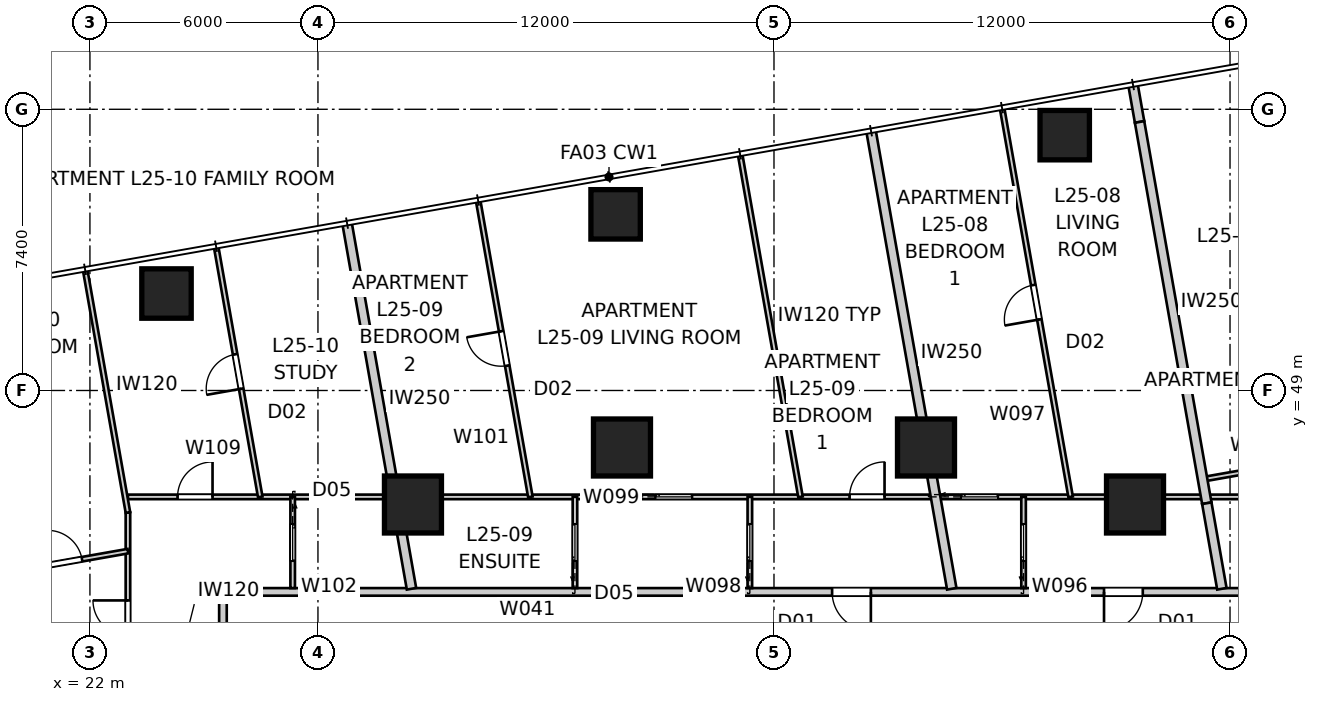
"""IFC4 building model, lengths in metres.
Left out: names, types, materials, properties, quantities, classifications, styles, units other than length and angle.
Written with IfcOpenShell. Run it as: python <this file> out.ifc"""

import sys

from ifc_helpers import new_model, si_unit, direction, frame, frame_2d, origin, origin_2d, place, context, subcontext, project, spatial, rectangle, extrude, element, fill, save


model = new_model("IFC4")
c1 = context("Model", 3, precision=1e-05, world=origin(), true_north=direction((0.0, 1.0)))
c2 = subcontext(c1, "Body", "Model", "MODEL_VIEW")
j1 = project(units=[si_unit("LENGTHUNIT", "METRE"), si_unit("PLANEANGLEUNIT", "RADIAN")], contexts=[c1])
p1 = place(None, origin())
s1 = spatial("IfcSite", under=j1, at=p1, CompositionType="ELEMENT")
p2 = place(p1, origin())
s2 = spatial("IfcBuilding", under=s1, at=p2, CompositionType="ELEMENT")
p3 = place(p2, frame((0.0, 0.0, 93.0)))
s3 = spatial("IfcBuildingStorey", under=s2, at=p3, CompositionType="ELEMENT", Elevation=93.0)
for number, where, z_axis, x_axis in (
    (1, (47.65, 55.719, 0.0), (0.0, 0.0, 1.0), (1.0, 0.0, 0.0)),
    (2, (35.833, 53.635, 0.0), (0.0, 0.0, 1.0), (1.0, 0.0, 0.0)),
    (3, (24.015, 51.552, 0.0), (0.0, 0.0, 1.0), (1.0, 0.0, 0.0)),
):
    element("IfcColumn", number, at=place(p3, frame(where, z_axis=z_axis, x_axis=x_axis)), inside=s3, PredefinedType="COLUMN", context=c2, shape_type="SweptSolid", body=[
        extrude(rectangle(XDim=1.3, YDim=1.3, at=origin_2d()), origin(), (0.0, 0.0, 1.0), 3.4),
    ])
for number, where, z_axis, x_axis in (
    (4, (49.5, 46.0, 0.0), (0.0, 0.0, 1.0), (1.0, 0.0, 0.0)),
    (5, (44.0, 47.5, 0.0), (0.0, 0.0, 1.0), (1.0, 0.0, 0.0)),
    (6, (36.0, 47.5, 0.0), (0.0, 0.0, 1.0), (1.0, 0.0, 0.0)),
    (7, (30.5, 46.0, 0.0), (0.0, 0.0, 1.0), (1.0, 0.0, 0.0)),
):
    element("IfcColumn", number, at=place(p3, frame(where, z_axis=z_axis, x_axis=x_axis)), inside=s3, PredefinedType="COLUMN", context=c2, shape_type="SweptSolid", body=[
        extrude(rectangle(XDim=1.5, YDim=1.5, at=origin_2d()), origin(), (0.0, 0.0, 1.0), 3.4),
    ])
p4 = place(p3, frame((54.5, 43.7, 0.0), z_axis=(0.0, 0.0, 1.0), x_axis=(-1.0, 0.0, 0.0)))
e8 = element("IfcWall", 8, at=p4, inside=s3, PredefinedType="PARTITIONING", context=c2, shape_type="SweptSolid", body=[
    extrude(rectangle(XDim=29.0, YDim=0.2, at=frame_2d((14.5, 0.0))), origin(), (0.0, 0.0, 1.0), 3.25),
])
p5 = place(p4, frame((11.951, 0.0, 0.0)))
e9 = element("IfcOpeningElement", 9, at=p5, cuts=e8, PredefinedType="OPENING", context=c2, shape_type="SweptSolid", body=[
    extrude(rectangle(XDim=1.02, YDim=2.34, at=frame_2d((0.51, 1.17))), frame((0.0, 0.11, 0.0), z_axis=(0.0, -1.0, 0.0), x_axis=(1.0, 0.0, 0.0)), (0.0, 0.0, 1.0), 0.22),
])
p6 = place(p4, frame((4.795, 0.0, 0.0)))
e10 = element("IfcOpeningElement", 10, at=p6, cuts=e8, PredefinedType="OPENING", context=c2, shape_type="SweptSolid", body=[
    extrude(rectangle(XDim=1.02, YDim=2.34, at=frame_2d((0.51, 1.17))), frame((0.0, 0.11, 0.0), z_axis=(0.0, -1.0, 0.0), x_axis=(1.0, 0.0, 0.0)), (0.0, 0.0, 1.0), 0.22),
])
p7 = place(p3, frame((25.5, 43.7, 0.0), z_axis=(0.0, 0.0, 1.0), x_axis=(0.0, -1.0, 0.0)))
e11 = element("IfcWall", 11, at=p7, inside=s3, PredefinedType="PARTITIONING", context=c2, shape_type="SweptSolid", body=[
    extrude(rectangle(XDim=27.4, YDim=0.2, at=frame_2d((13.7, 0.0))), origin(), (0.0, 0.0, 1.0), 3.25),
])
p8 = place(p7, frame((24.333, 0.0, 0.0)))
e12 = element("IfcOpeningElement", 12, at=p8, cuts=e11, PredefinedType="OPENING", context=c2, shape_type="SweptSolid", body=[
    extrude(rectangle(XDim=1.02, YDim=2.1, at=frame_2d((0.51, 1.05))), frame((0.0, 0.11, 0.0), z_axis=(0.0, -1.0, 0.0), x_axis=(1.0, 0.0, 0.0)), (0.0, 0.0, 1.0), 0.22),
])
p9 = place(p7, frame((10.631, 0.0, 0.0)))
e13 = element("IfcOpeningElement", 13, at=p9, cuts=e11, PredefinedType="OPENING", context=c2, shape_type="SweptSolid", body=[
    extrude(rectangle(XDim=1.02, YDim=2.34, at=frame_2d((0.51, 1.17))), frame((0.0, 0.11, 0.0), z_axis=(0.0, -1.0, 0.0), x_axis=(1.0, 0.0, 0.0)), (0.0, 0.0, 1.0), 0.22),
])
p10 = place(p7, frame((0.911, 0.0, 0.0)))
e14 = element("IfcOpeningElement", 14, at=p10, cuts=e11, PredefinedType="OPENING", context=c2, shape_type="SweptSolid", body=[
    extrude(rectangle(XDim=1.02, YDim=2.34, at=frame_2d((0.51, 1.17))), frame((0.0, 0.11, 0.0), z_axis=(0.0, -1.0, 0.0), x_axis=(1.0, 0.0, 0.0)), (0.0, 0.0, 1.0), 0.22),
])
p11 = place(p3, frame((42.552, 55.836, 0.0), z_axis=(0.0, 0.0, 1.0), x_axis=(0.173639677872, -0.984809251718, 0.0)))
e15 = element("IfcWall", 15, at=p11, inside=s3, PredefinedType="PARTITIONING", context=c2, shape_type="SweptSolid", body=[
    extrude(rectangle(XDim=12.24, YDim=0.25, at=frame_2d((6.12, 0.0))), origin(), (0.0, 0.0, 1.0), 3.25),
])
p12 = place(p3, frame((28.765, 53.405, 0.0), z_axis=(0.0, 0.0, 1.0), x_axis=(0.173658469802, -0.984805938176, 0.0)))
e16 = element("IfcWall", 16, at=p12, inside=s3, PredefinedType="PARTITIONING", context=c2, shape_type="SweptSolid", body=[
    extrude(rectangle(XDim=9.771, YDim=0.25, at=frame_2d((4.885, 0.0))), origin(), (0.0, 0.0, 1.0), 3.25),
])
p13 = place(p3, frame((49.446, 57.051, 0.0), z_axis=(0.0, 0.0, 1.0), x_axis=(0.173813186416, -0.984778643263, 0.0)))
e17 = element("IfcWall", 17, at=p13, inside=s3, PredefinedType="PARTITIONING", context=c2, shape_type="SweptSolid", body=[
    extrude(rectangle(XDim=1.0, YDim=0.25, at=frame_2d((0.5, 0.0))), origin(), (0.0, 0.0, 1.0), 3.25),
])
p14 = place(p3, frame((49.62, 56.066, 0.0), z_axis=(0.0, 0.0, 1.0), x_axis=(0.173644522411, -0.984808397525, 0.0)))
e18 = element("IfcWall", 18, at=p14, inside=s3, PredefinedType="PARTITIONING", context=c2, shape_type="SweptSolid", body=[
    extrude(rectangle(XDim=10.188, YDim=0.25, at=frame_2d((5.094, 0.0))), origin(), (0.0, 0.0, 1.0), 2.638),
])
p15 = place(p3, frame((51.389, 46.033, 0.0), z_axis=(0.0, 0.0, 1.0), x_axis=(0.173657387043, -0.984806129106, 0.0)))
e19 = element("IfcWall", 19, at=p15, inside=s3, PredefinedType="PARTITIONING", context=c2, shape_type="SweptSolid", body=[
    extrude(rectangle(XDim=2.286, YDim=0.25, at=frame_2d((1.143, 0.0))), origin(), (0.0, 0.0, 1.0), 3.25),
])
p16 = place(p3, frame((23.0, 46.2, 0.0), z_axis=(0.0, 0.0, 1.0), x_axis=(1.0, 0.0, 0.0)))
e20 = element("IfcWall", 20, at=p16, inside=s3, PredefinedType="PARTITIONING", context=c2, shape_type="SweptSolid", body=[
    extrude(rectangle(XDim=34.0, YDim=0.12, at=frame_2d((17.0, 0.0))), origin(), (0.0, 0.0, 1.0), 2.55),
])
p17 = place(p16, frame((18.989, 0.0, 0.0)))
e21 = element("IfcOpeningElement", 21, at=p17, cuts=e20, PredefinedType="OPENING", context=c2, shape_type="SweptSolid", body=[
    extrude(rectangle(XDim=0.92, YDim=2.34, at=frame_2d((0.46, 1.17))), frame((0.0, 0.07, 0.0), z_axis=(0.0, -1.0, 0.0), x_axis=(1.0, 0.0, 0.0)), (0.0, 0.0, 1.0), 0.14),
])
p18 = place(p16, frame((1.306, 0.0, 0.0)))
e22 = element("IfcOpeningElement", 22, at=p18, cuts=e20, PredefinedType="OPENING", context=c2, shape_type="SweptSolid", body=[
    extrude(rectangle(XDim=0.92, YDim=2.34, at=frame_2d((0.46, 1.17))), frame((0.0, 0.07, 0.0), z_axis=(0.0, -1.0, 0.0), x_axis=(1.0, 0.0, 0.0)), (0.0, 0.0, 1.0), 0.14),
])
p19 = place(p16, frame((13.884, 0.0, 0.0)))
e23 = element("IfcOpeningElement", 23, at=p19, cuts=e20, PredefinedType="OPENING", context=c2, shape_type="SweptSolid", body=[
    extrude(rectangle(XDim=0.96, YDim=2.1, at=frame_2d((0.48, 1.05))), frame((0.0, 0.07, 0.0), z_axis=(0.0, -1.0, 0.0), x_axis=(1.0, 0.0, 0.0)), (0.0, 0.0, 1.0), 0.14),
])
p20 = place(p16, frame((21.929, 0.0, 0.0)))
e24 = element("IfcOpeningElement", 24, at=p20, cuts=e20, PredefinedType="OPENING", context=c2, shape_type="SweptSolid", body=[
    extrude(rectangle(XDim=0.96, YDim=2.1, at=frame_2d((0.48, 1.05))), frame((0.0, 0.07, 0.0), z_axis=(0.0, -1.0, 0.0), x_axis=(1.0, 0.0, 0.0)), (0.0, 0.0, 1.0), 0.14),
])
p21 = place(p3, frame((58.172, 47.877, 0.0), z_axis=(0.0, 0.0, 1.0), x_axis=(-0.984806372973, -0.173656004074, 0.0)))
e25 = element("IfcWall", 25, at=p21, inside=s3, PredefinedType="PARTITIONING", context=c2, shape_type="SweptSolid", body=[
    extrude(rectangle(XDim=7.0, YDim=0.12, at=frame_2d((3.5, 0.0))), origin(), (0.0, 0.0, 1.0), 3.25),
])
p22 = place(p21, frame((2.89, 0.0, 0.0)))
e26 = element("IfcOpeningElement", 26, at=p22, cuts=e25, PredefinedType="OPENING", context=c2, shape_type="SweptSolid", body=[
    extrude(rectangle(XDim=0.92, YDim=2.34, at=frame_2d((0.46, 1.17))), frame((0.0, 0.07, 0.0), z_axis=(0.0, -1.0, 0.0), x_axis=(1.0, 0.0, 0.0)), (0.0, 0.0, 1.0), 0.14),
])
p23 = place(p3, frame((46.567, 43.8, 0.0), z_axis=(0.0, 0.0, 1.0), x_axis=(0.0, 1.0, 0.0)))
e27 = element("IfcWall", 27, at=p23, inside=s3, PredefinedType="PARTITIONING", context=c2, shape_type="SweptSolid", body=[
    extrude(rectangle(XDim=2.4, YDim=0.12, at=frame_2d((1.2, 0.0))), origin(), (0.0, 0.0, 1.0), 3.25),
])
p24 = place(p23, frame((0.72, 0.0, 0.0)))
e28 = element("IfcOpeningElement", 28, at=p24, cuts=e27, PredefinedType="OPENING", context=c2, shape_type="SweptSolid", body=[
    extrude(rectangle(XDim=0.96, YDim=2.1, at=frame_2d((0.48, 1.05))), frame((0.0, 0.07, 0.0), z_axis=(0.0, -1.0, 0.0), x_axis=(1.0, 0.0, 0.0)), (0.0, 0.0, 1.0), 0.14),
])
p25 = place(p3, frame((47.805, 46.2, 0.0), z_axis=(0.0, 0.0, 1.0), x_axis=(-0.173653605279, 0.984806795962, 0.0)))
e29 = element("IfcWall", 29, at=p25, inside=s3, PredefinedType="PARTITIONING", context=c2, shape_type="SweptSolid", body=[
    extrude(rectangle(XDim=10.362, YDim=0.12, at=frame_2d((5.181, 0.0))), origin(), (0.0, 0.0, 1.0), 3.25),
])
p26 = place(p25, frame((4.741, 0.0, 0.0)))
e30 = element("IfcOpeningElement", 30, at=p26, cuts=e29, PredefinedType="OPENING", context=c2, shape_type="SweptSolid", body=[
    extrude(rectangle(XDim=0.92, YDim=2.34, at=frame_2d((0.46, 1.17))), frame((0.0, 0.07, 0.0), z_axis=(0.0, -1.0, 0.0), x_axis=(1.0, 0.0, 0.0)), (0.0, 0.0, 1.0), 0.14),
])
p27 = place(p3, frame((39.365, 43.8, 0.0), z_axis=(0.0, 0.0, 1.0), x_axis=(0.0, 1.0, 0.0)))
e31 = element("IfcWall", 31, at=p27, inside=s3, PredefinedType="PARTITIONING", context=c2, shape_type="SweptSolid", body=[
    extrude(rectangle(XDim=2.4, YDim=0.12, at=frame_2d((1.2, 0.0))), origin(), (0.0, 0.0, 1.0), 3.25),
])
p28 = place(p27, frame((0.72, 0.0, 0.0)))
e32 = element("IfcOpeningElement", 32, at=p28, cuts=e31, PredefinedType="OPENING", context=c2, shape_type="SweptSolid", body=[
    extrude(rectangle(XDim=0.96, YDim=2.1, at=frame_2d((0.48, 1.05))), frame((0.0, 0.07, 0.0), z_axis=(0.0, -1.0, 0.0), x_axis=(1.0, 0.0, 0.0)), (0.0, 0.0, 1.0), 0.14),
])
p29 = place(p3, frame((34.763, 43.8, 0.0), z_axis=(0.0, 0.0, 1.0), x_axis=(0.0, 1.0, 0.0)))
e33 = element("IfcWall", 33, at=p29, inside=s3, PredefinedType="PARTITIONING", context=c2, shape_type="SweptSolid", body=[
    extrude(rectangle(XDim=2.4, YDim=0.12, at=frame_2d((1.2, 0.0))), origin(), (0.0, 0.0, 1.0), 3.25),
])
p30 = place(p29, frame((0.72, 0.0, 0.0)))
e34 = element("IfcOpeningElement", 34, at=p30, cuts=e33, PredefinedType="OPENING", context=c2, shape_type="SweptSolid", body=[
    extrude(rectangle(XDim=0.96, YDim=2.1, at=frame_2d((0.48, 1.05))), frame((0.0, 0.07, 0.0), z_axis=(0.0, -1.0, 0.0), x_axis=(1.0, 0.0, 0.0)), (0.0, 0.0, 1.0), 0.14),
])
p31 = place(p3, frame((39.113, 55.188, 0.0), z_axis=(0.0, 0.0, 1.0), x_axis=(0.173652576186, -0.984806977424, 0.0)))
e35 = element("IfcWall", 35, at=p31, inside=s3, PredefinedType="PARTITIONING", context=c2, shape_type="SweptSolid", body=[
    extrude(rectangle(XDim=9.127, YDim=0.12, at=frame_2d((4.563, 0.0))), origin(), (0.0, 0.0, 1.0), 3.25),
])
p32 = place(p3, frame((33.59, 46.2, 0.0), z_axis=(0.0, 0.0, 1.0), x_axis=(-0.173645935638, 0.98480814834, 0.0)))
e36 = element("IfcWall", 36, at=p32, inside=s3, PredefinedType="PARTITIONING", context=c2, shape_type="SweptSolid", body=[
    extrude(rectangle(XDim=7.893, YDim=0.12, at=frame_2d((3.947, 0.0))), origin(), (0.0, 0.0, 1.0), 3.25),
])
p33 = place(p32, frame((3.507, 0.0, 0.0)))
e37 = element("IfcOpeningElement", 37, at=p33, cuts=e36, PredefinedType="OPENING", context=c2, shape_type="SweptSolid", body=[
    extrude(rectangle(XDim=0.92, YDim=2.34, at=frame_2d((0.46, 1.17))), frame((0.0, 0.07, 0.0), z_axis=(0.0, -1.0, 0.0), x_axis=(1.0, 0.0, 0.0)), (0.0, 0.0, 1.0), 0.14),
])
p34 = place(p3, frame((27.335, 46.2, 0.0), z_axis=(0.0, 0.0, 1.0), x_axis=(0.0, -1.0, 0.0)))
e38 = element("IfcWall", 38, at=p34, inside=s3, PredefinedType="PARTITIONING", context=c2, shape_type="SweptSolid", body=[
    extrude(rectangle(XDim=2.4, YDim=0.12, at=frame_2d((1.2, 0.0))), origin(), (0.0, 0.0, 1.0), 2.722),
])
p35 = place(p34, frame((0.72, 0.0, 0.0)))
e39 = element("IfcOpeningElement", 39, at=p35, cuts=e38, PredefinedType="OPENING", context=c2, shape_type="SweptSolid", body=[
    extrude(rectangle(XDim=0.96, YDim=2.1, at=frame_2d((0.48, 1.05))), frame((0.0, 0.07, 0.0), z_axis=(0.0, -1.0, 0.0), x_axis=(1.0, 0.0, 0.0)), (0.0, 0.0, 1.0), 0.14),
])
p36 = place(p3, frame((23.0, 41.208, 0.0), z_axis=(0.0, 0.0, 1.0), x_axis=(0.0, 1.0, 0.0)))
e40 = element("IfcWall", 40, at=p36, inside=s3, PredefinedType="PARTITIONING", context=c2, shape_type="SweptSolid", body=[
    extrude(rectangle(XDim=4.581, YDim=0.12, at=frame_2d((2.291, 0.0))), origin(), (0.0, 0.0, 1.0), 2.638),
])
p37 = place(p36, frame((1.348, 0.0, 0.0)))
e41 = element("IfcOpeningElement", 41, at=p37, cuts=e40, PredefinedType="OPENING", context=c2, shape_type="SweptSolid", body=[
    extrude(rectangle(XDim=0.92, YDim=2.34, at=frame_2d((0.46, 1.17))), frame((0.0, 0.07, 0.0), z_axis=(0.0, -1.0, 0.0), x_axis=(1.0, 0.0, 0.0)), (0.0, 0.0, 1.0), 0.14),
])
p38 = place(p3, frame((12.38, 42.9, 0.0), z_axis=(0.0, 0.0, 1.0), x_axis=(0.984807253583, 0.173651010046, 0.0)))
e42 = element("IfcWall", 42, at=p38, inside=s3, PredefinedType="PARTITIONING", context=c2, shape_type="SweptSolid", body=[
    extrude(rectangle(XDim=10.783, YDim=0.12, at=frame_2d((5.392, 0.0))), origin(), (0.0, 0.0, 1.0), 3.25),
])
p39 = place(p38, frame((1.525, 0.0, 0.0)))
e43 = element("IfcOpeningElement", 43, at=p39, cuts=e42, PredefinedType="OPENING", context=c2, shape_type="SweptSolid", body=[
    extrude(rectangle(XDim=0.92, YDim=2.34, at=frame_2d((0.46, 1.17))), frame((0.0, 0.07, 0.0), z_axis=(0.0, -1.0, 0.0), x_axis=(1.0, 0.0, 0.0)), (0.0, 0.0, 1.0), 0.14),
])
p40 = place(p38, frame((5.25, 0.0, 0.0)))
e44 = element("IfcOpeningElement", 44, at=p40, cuts=e42, PredefinedType="OPENING", context=c2, shape_type="SweptSolid", body=[
    extrude(rectangle(XDim=0.92, YDim=2.34, at=frame_2d((0.46, 1.17))), frame((0.0, 0.07, 0.0), z_axis=(0.0, -1.0, 0.0), x_axis=(1.0, 0.0, 0.0)), (0.0, 0.0, 1.0), 0.14),
])
p41 = place(p38, frame((8.637, 0.0, 0.0)))
e45 = element("IfcOpeningElement", 45, at=p41, cuts=e42, PredefinedType="OPENING", context=c2, shape_type="SweptSolid", body=[
    extrude(rectangle(XDim=0.92, YDim=2.34, at=frame_2d((0.46, 1.17))), frame((0.0, 0.07, 0.0), z_axis=(0.0, -1.0, 0.0), x_axis=(1.0, 0.0, 0.0)), (0.0, 0.0, 1.0), 0.14),
])
p42 = place(p3, frame((21.878, 52.15, 0.0), z_axis=(0.0, 0.0, 1.0), x_axis=(0.173653792983, -0.984806762864, 0.0)))
e46 = element("IfcWall", 46, at=p42, inside=s3, PredefinedType="PARTITIONING", context=c2, shape_type="SweptSolid", body=[
    extrude(rectangle(XDim=6.459, YDim=0.12, at=frame_2d((3.229, 0.0))), origin(), (0.0, 0.0, 1.0), 2.638),
])
p43 = place(p3, frame((26.481, 46.2, 0.0), z_axis=(0.0, 0.0, 1.0), x_axis=(-0.173643103339, 0.98480864774, 0.0)))
e47 = element("IfcWall", 47, at=p43, inside=s3, PredefinedType="PARTITIONING", context=c2, shape_type="SweptSolid", body=[
    extrude(rectangle(XDim=6.659, YDim=0.12, at=frame_2d((3.329, 0.0))), origin(), (0.0, 0.0, 1.0), 3.25),
])
p44 = place(p43, frame((2.889, 0.0, 0.0)))
e48 = element("IfcOpeningElement", 48, at=p44, cuts=e47, PredefinedType="OPENING", context=c2, shape_type="SweptSolid", body=[
    extrude(rectangle(XDim=0.92, YDim=2.34, at=frame_2d((0.46, 1.17))), frame((0.0, 0.07, 0.0), z_axis=(0.0, -1.0, 0.0), x_axis=(1.0, 0.0, 0.0)), (0.0, 0.0, 1.0), 0.14),
])
p45 = place(p5, origin())
e49 = element("IfcDoor", 49, at=p45, inside=s3, OperationType="SINGLE_SWING_LEFT", PredefinedType="DOOR", context=c2, shape_type="SweptSolid", body=[
    extrude(rectangle(XDim=1.02, YDim=2.34, at=frame_2d((0.51, 1.17))), frame((0.0, 0.025, 0.0), z_axis=(0.0, -1.0, 0.0), x_axis=(1.0, 0.0, 0.0)), (0.0, 0.0, 1.0), 0.05),
])
fill(e9, e49)
p46 = place(p6, origin())
e50 = element("IfcDoor", 50, at=p46, inside=s3, OperationType="SINGLE_SWING_RIGHT", PredefinedType="DOOR", context=c2, shape_type="SweptSolid", body=[
    extrude(rectangle(XDim=1.02, YDim=2.34, at=frame_2d((0.51, 1.17))), frame((0.0, 0.025, 0.0), z_axis=(0.0, -1.0, 0.0), x_axis=(1.0, 0.0, 0.0)), (0.0, 0.0, 1.0), 0.05),
])
fill(e10, e50)
p47 = place(p17, origin())
e51 = element("IfcDoor", 51, at=p47, inside=s3, OperationType="SINGLE_SWING_RIGHT", PredefinedType="DOOR", context=c2, shape_type="SweptSolid", body=[
    extrude(rectangle(XDim=0.92, YDim=2.34, at=frame_2d((0.46, 1.17))), frame((0.0, 0.025, 0.0), z_axis=(0.0, -1.0, 0.0), x_axis=(1.0, 0.0, 0.0)), (0.0, 0.0, 1.0), 0.05),
])
fill(e21, e51)
p48 = place(p28, origin())
e52 = element("IfcDoor", 52, at=p48, inside=s3, OperationType="SLIDING_TO_LEFT", PredefinedType="DOOR", context=c2, shape_type="SweptSolid", body=[
    extrude(rectangle(XDim=0.96, YDim=2.1, at=frame_2d((0.48, 1.05))), frame((0.0, 0.025, 0.0), z_axis=(0.0, -1.0, 0.0), x_axis=(1.0, 0.0, 0.0)), (0.0, 0.0, 1.0), 0.05),
])
fill(e32, e52)
p49 = place(p24, origin())
e53 = element("IfcDoor", 53, at=p49, inside=s3, OperationType="SLIDING_TO_LEFT", PredefinedType="DOOR", context=c2, shape_type="SweptSolid", body=[
    extrude(rectangle(XDim=0.96, YDim=2.1, at=frame_2d((0.48, 1.05))), frame((0.0, 0.025, 0.0), z_axis=(0.0, -1.0, 0.0), x_axis=(1.0, 0.0, 0.0)), (0.0, 0.0, 1.0), 0.05),
])
fill(e28, e53)
p50 = place(p37, origin())
e54 = element("IfcDoor", 54, at=p50, inside=s3, OperationType="SINGLE_SWING_RIGHT", PredefinedType="DOOR", context=c2, shape_type="SweptSolid", body=[
    extrude(rectangle(XDim=0.92, YDim=2.34, at=frame_2d((0.46, 1.17))), frame((0.0, 0.025, 0.0), z_axis=(0.0, -1.0, 0.0), x_axis=(1.0, 0.0, 0.0)), (0.0, 0.0, 1.0), 0.05),
])
fill(e41, e54)
p51 = place(p18, origin())
e55 = element("IfcDoor", 55, at=p51, inside=s3, OperationType="SINGLE_SWING_RIGHT", PredefinedType="DOOR", context=c2, shape_type="SweptSolid", body=[
    extrude(rectangle(XDim=0.92, YDim=2.34, at=frame_2d((0.46, 1.17))), frame((0.0, 0.025, 0.0), z_axis=(0.0, -1.0, 0.0), x_axis=(1.0, 0.0, 0.0)), (0.0, 0.0, 1.0), 0.05),
])
fill(e22, e55)
p52 = place(p35, origin())
e56 = element("IfcDoor", 56, at=p52, inside=s3, OperationType="SLIDING_TO_LEFT", PredefinedType="DOOR", context=c2, shape_type="SweptSolid", body=[
    extrude(rectangle(XDim=0.96, YDim=2.1, at=frame_2d((0.48, 1.05))), frame((0.0, 0.025, 0.0), z_axis=(0.0, -1.0, 0.0), x_axis=(1.0, 0.0, 0.0)), (0.0, 0.0, 1.0), 0.05),
])
fill(e39, e56)
p53 = place(p19, origin())
e57 = element("IfcDoor", 57, at=p53, inside=s3, OperationType="SLIDING_TO_LEFT", PredefinedType="DOOR", context=c2, shape_type="SweptSolid", body=[
    extrude(rectangle(XDim=0.96, YDim=2.1, at=frame_2d((0.48, 1.05))), frame((0.0, 0.025, 0.0), z_axis=(0.0, -1.0, 0.0), x_axis=(1.0, 0.0, 0.0)), (0.0, 0.0, 1.0), 0.05),
])
fill(e23, e57)
p54 = place(p30, origin())
e58 = element("IfcDoor", 58, at=p54, inside=s3, OperationType="SLIDING_TO_LEFT", PredefinedType="DOOR", context=c2, shape_type="SweptSolid", body=[
    extrude(rectangle(XDim=0.96, YDim=2.1, at=frame_2d((0.48, 1.05))), frame((0.0, 0.025, 0.0), z_axis=(0.0, -1.0, 0.0), x_axis=(1.0, 0.0, 0.0)), (0.0, 0.0, 1.0), 0.05),
])
fill(e34, e58)
p55 = place(p20, origin())
e59 = element("IfcDoor", 59, at=p55, inside=s3, OperationType="SLIDING_TO_LEFT", PredefinedType="DOOR", context=c2, shape_type="SweptSolid", body=[
    extrude(rectangle(XDim=0.96, YDim=2.1, at=frame_2d((0.48, 1.05))), frame((0.0, 0.025, 0.0), z_axis=(0.0, -1.0, 0.0), x_axis=(1.0, 0.0, 0.0)), (0.0, 0.0, 1.0), 0.05),
])
fill(e24, e59)
p56 = place(p41, origin())
e60 = element("IfcDoor", 60, at=p56, inside=s3, OperationType="SINGLE_SWING_LEFT", PredefinedType="DOOR", context=c2, shape_type="SweptSolid", body=[
    extrude(rectangle(XDim=0.92, YDim=2.34, at=frame_2d((0.46, 1.17))), frame((0.0, 0.025, 0.0), z_axis=(0.0, -1.0, 0.0), x_axis=(1.0, 0.0, 0.0)), (0.0, 0.0, 1.0), 0.05),
])
fill(e45, e60)
p57 = place(p44, origin())
e61 = element("IfcDoor", 61, at=p57, inside=s3, OperationType="SINGLE_SWING_LEFT", PredefinedType="DOOR", context=c2, shape_type="SweptSolid", body=[
    extrude(rectangle(XDim=0.92, YDim=2.34, at=frame_2d((0.46, 1.17))), frame((0.0, 0.025, 0.0), z_axis=(0.0, -1.0, 0.0), x_axis=(1.0, 0.0, 0.0)), (0.0, 0.0, 1.0), 0.05),
])
fill(e48, e61)
p58 = place(p33, origin())
e62 = element("IfcDoor", 62, at=p58, inside=s3, OperationType="SINGLE_SWING_RIGHT", PredefinedType="DOOR", context=c2, shape_type="SweptSolid", body=[
    extrude(rectangle(XDim=0.92, YDim=2.34, at=frame_2d((0.46, 1.17))), frame((0.0, 0.025, 0.0), z_axis=(0.0, -1.0, 0.0), x_axis=(1.0, 0.0, 0.0)), (0.0, 0.0, 1.0), 0.05),
])
fill(e37, e62)
p59 = place(p26, origin())
e63 = element("IfcDoor", 63, at=p59, inside=s3, OperationType="SINGLE_SWING_LEFT", PredefinedType="DOOR", context=c2, shape_type="SweptSolid", body=[
    extrude(rectangle(XDim=0.92, YDim=2.34, at=frame_2d((0.46, 1.17))), frame((0.0, 0.025, 0.0), z_axis=(0.0, -1.0, 0.0), x_axis=(1.0, 0.0, 0.0)), (0.0, 0.0, 1.0), 0.05),
])
fill(e30, e63)
save(model, sys.argv[1])
